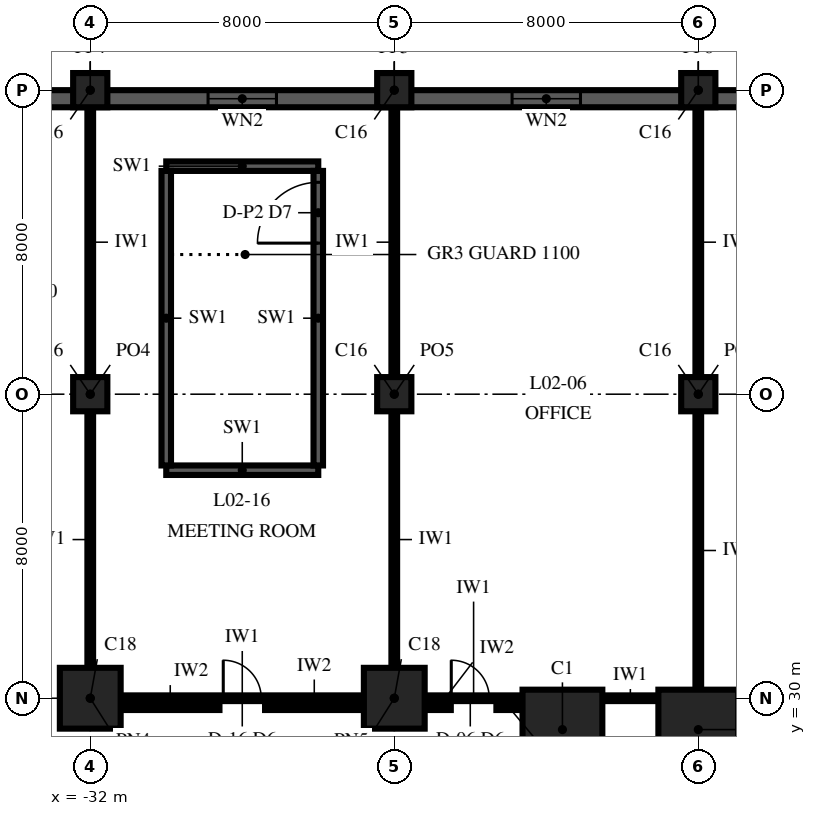
"""IFC4 building model, lengths in metres.
Left out: names, types, materials, properties, quantities, classifications, styles, units other than length and angle.
Written with IfcOpenShell. Run it as: python <this file> out.ifc"""

import sys

from ifc_helpers import new_model, si_unit, direction, frame, frame_2d, origin, origin_2d, place, context, subcontext, project, spatial, rectangle, extrude, element, fill, save


model = new_model("IFC4")
c1 = context("Model", 3, precision=1e-05, world=origin(), true_north=direction((0.0, 1.0)))
c2 = subcontext(c1, "Body", "Model", "MODEL_VIEW")
j1 = project(units=[si_unit("LENGTHUNIT", "METRE"), si_unit("PLANEANGLEUNIT", "RADIAN")], contexts=[c1])
p1 = place(None, origin())
s1 = spatial("IfcSite", under=j1, at=p1, CompositionType="ELEMENT")
p2 = place(p1, origin())
s2 = spatial("IfcBuilding", under=s1, at=p2, CompositionType="ELEMENT")
p3 = place(p2, frame((0.0, 0.0, 12.0)))
s3 = spatial("IfcBuildingStorey", under=s2, at=p3, CompositionType="ELEMENT", Elevation=12.0)
for number, where, z_axis, x_axis in (
    (1, (-16.0, 29.175, 0.0), (0.0, 0.0, 1.0), (-1.0, 0.0, 0.0)),
    (2, (-19.575, 29.175, 0.0), (0.0, 0.0, 1.0), (-1.0, 0.0, 0.0)),
):
    element("IfcColumn", number, at=place(p3, frame(where, z_axis=z_axis, x_axis=x_axis)), inside=s3, PredefinedType="COLUMN", context=c2, shape_type="SweptSolid", body=[
        extrude(rectangle(XDim=2.1, YDim=2.1, at=origin_2d()), origin(), (0.0, 0.0, 1.0), 7.0),
    ])
p4 = place(p3, frame((-32.0, 30.0, 0.0), z_axis=(0.0, 0.0, 1.0), x_axis=(1.0, 0.0, 0.0)))
e3 = element("IfcColumn", 3, at=p4, inside=s3, PredefinedType="COLUMN", context=c2, shape_type="SweptSolid", body=[
    extrude(rectangle(XDim=1.6, YDim=1.6, at=origin_2d()), origin(), (0.0, 0.0, 1.0), 7.0),
])
for number, where, z_axis, x_axis in (
    (4, (-32.0, 38.0, 0.0), (0.0, 0.0, 1.0), (1.0, 0.0, 0.0)),
    (5, (-32.0, 46.0, 0.0), (0.0, 0.0, 1.0), (1.0, 0.0, 0.0)),
):
    element("IfcColumn", number, at=place(p3, frame(where, z_axis=z_axis, x_axis=x_axis)), inside=s3, PredefinedType="COLUMN", context=c2, shape_type="SweptSolid", body=[
        extrude(rectangle(XDim=0.9, YDim=0.9, at=origin_2d()), origin(), (0.0, 0.0, 1.0), 7.0),
    ])
p5 = place(p3, frame((-24.0, 30.0, 0.0), z_axis=(0.0, 0.0, 1.0), x_axis=(1.0, 0.0, 0.0)))
e6 = element("IfcColumn", 6, at=p5, inside=s3, PredefinedType="COLUMN", context=c2, shape_type="SweptSolid", body=[
    extrude(rectangle(XDim=1.6, YDim=1.6, at=origin_2d()), origin(), (0.0, 0.0, 1.0), 7.0),
])
for number, where, z_axis, x_axis in (
    (7, (-24.0, 38.0, 0.0), (0.0, 0.0, 1.0), (1.0, 0.0, 0.0)),
    (8, (-24.0, 46.0, 0.0), (0.0, 0.0, 1.0), (1.0, 0.0, 0.0)),
    (9, (-16.0, 38.0, 0.0), (0.0, 0.0, 1.0), (1.0, 0.0, 0.0)),
    (10, (-16.0, 46.0, 0.0), (0.0, 0.0, 1.0), (1.0, 0.0, 0.0)),
):
    element("IfcColumn", number, at=place(p3, frame(where, z_axis=z_axis, x_axis=x_axis)), inside=s3, PredefinedType="COLUMN", context=c2, shape_type="SweptSolid", body=[
        extrude(rectangle(XDim=0.9, YDim=0.9, at=origin_2d()), origin(), (0.0, 0.0, 1.0), 7.0),
    ])
p6 = place(p3, frame((56.0, 45.775, 0.0), z_axis=(0.0, 0.0, 1.0), x_axis=(-1.0, 0.0, 0.0)))
e11 = element("IfcWall", 11, at=p6, inside=s3, PredefinedType="SOLIDWALL", context=c2, shape_type="SweptSolid", body=[
    extrude(rectangle(XDim=90.0, YDim=0.45, at=frame_2d((45.0, 0.0))), origin(), (0.0, 0.0, 1.0), 7.0),
])
p7 = place(p6, frame((3.1, 0.0, 1.0)))
e12 = element("IfcOpeningElement", 12, at=p7, cuts=e11, PredefinedType="OPENING", context=c2, shape_type="SweptSolid", body=[
    extrude(rectangle(XDim=1.8, YDim=3.0, at=frame_2d((0.9, 1.5))), frame((0.0, 0.24, 0.0), z_axis=(0.0, -1.0, 0.0), x_axis=(1.0, 0.0, 0.0)), (0.0, 0.0, 1.0), 0.48),
])
p8 = place(p6, frame((11.1, 0.0, 1.0)))
e13 = element("IfcOpeningElement", 13, at=p8, cuts=e11, PredefinedType="OPENING", context=c2, shape_type="SweptSolid", body=[
    extrude(rectangle(XDim=1.8, YDim=3.0, at=frame_2d((0.9, 1.5))), frame((0.0, 0.24, 0.0), z_axis=(0.0, -1.0, 0.0), x_axis=(1.0, 0.0, 0.0)), (0.0, 0.0, 1.0), 0.48),
])
p9 = place(p6, frame((19.1, 0.0, 1.0)))
e14 = element("IfcOpeningElement", 14, at=p9, cuts=e11, PredefinedType="OPENING", context=c2, shape_type="SweptSolid", body=[
    extrude(rectangle(XDim=1.8, YDim=3.0, at=frame_2d((0.9, 1.5))), frame((0.0, 0.24, 0.0), z_axis=(0.0, -1.0, 0.0), x_axis=(1.0, 0.0, 0.0)), (0.0, 0.0, 1.0), 0.48),
])
p10 = place(p6, frame((27.1, 0.0, 1.0)))
e15 = element("IfcOpeningElement", 15, at=p10, cuts=e11, PredefinedType="OPENING", context=c2, shape_type="SweptSolid", body=[
    extrude(rectangle(XDim=1.8, YDim=3.0, at=frame_2d((0.9, 1.5))), frame((0.0, 0.24, 0.0), z_axis=(0.0, -1.0, 0.0), x_axis=(1.0, 0.0, 0.0)), (0.0, 0.0, 1.0), 0.48),
])
p11 = place(p6, frame((34.9, 0.0, 1.0)))
e16 = element("IfcOpeningElement", 16, at=p11, cuts=e11, PredefinedType="OPENING", context=c2, shape_type="SweptSolid", body=[
    extrude(rectangle(XDim=0.9, YDim=3.0, at=frame_2d((0.45, 1.5))), frame((0.0, 0.24, 0.0), z_axis=(0.0, -1.0, 0.0), x_axis=(1.0, 0.0, 0.0)), (0.0, 0.0, 1.0), 0.48),
])
p12 = place(p6, frame((36.2, 0.0, 1.0)))
e17 = element("IfcOpeningElement", 17, at=p12, cuts=e11, PredefinedType="OPENING", context=c2, shape_type="SweptSolid", body=[
    extrude(rectangle(XDim=0.9, YDim=3.0, at=frame_2d((0.45, 1.5))), frame((0.0, 0.24, 0.0), z_axis=(0.0, -1.0, 0.0), x_axis=(1.0, 0.0, 0.0)), (0.0, 0.0, 1.0), 0.48),
])
p13 = place(p6, frame((43.1, 0.0, 1.0)))
e18 = element("IfcOpeningElement", 18, at=p13, cuts=e11, PredefinedType="OPENING", context=c2, shape_type="SweptSolid", body=[
    extrude(rectangle(XDim=1.8, YDim=3.0, at=frame_2d((0.9, 1.5))), frame((0.0, 0.24, 0.0), z_axis=(0.0, -1.0, 0.0), x_axis=(1.0, 0.0, 0.0)), (0.0, 0.0, 1.0), 0.48),
])
p14 = place(p6, frame((51.1, 0.0, 1.0)))
e19 = element("IfcOpeningElement", 19, at=p14, cuts=e11, PredefinedType="OPENING", context=c2, shape_type="SweptSolid", body=[
    extrude(rectangle(XDim=1.8, YDim=3.0, at=frame_2d((0.9, 1.5))), frame((0.0, 0.24, 0.0), z_axis=(0.0, -1.0, 0.0), x_axis=(1.0, 0.0, 0.0)), (0.0, 0.0, 1.0), 0.48),
])
p15 = place(p6, frame((59.1, 0.0, 1.0)))
e20 = element("IfcOpeningElement", 20, at=p15, cuts=e11, PredefinedType="OPENING", context=c2, shape_type="SweptSolid", body=[
    extrude(rectangle(XDim=1.8, YDim=3.0, at=frame_2d((0.9, 1.5))), frame((0.0, 0.24, 0.0), z_axis=(0.0, -1.0, 0.0), x_axis=(1.0, 0.0, 0.0)), (0.0, 0.0, 1.0), 0.48),
])
p16 = place(p6, frame((67.1, 0.0, 1.0)))
e21 = element("IfcOpeningElement", 21, at=p16, cuts=e11, PredefinedType="OPENING", context=c2, shape_type="SweptSolid", body=[
    extrude(rectangle(XDim=1.8, YDim=3.0, at=frame_2d((0.9, 1.5))), frame((0.0, 0.24, 0.0), z_axis=(0.0, -1.0, 0.0), x_axis=(1.0, 0.0, 0.0)), (0.0, 0.0, 1.0), 0.48),
])
p17 = place(p6, frame((75.1, 0.0, 1.0)))
e22 = element("IfcOpeningElement", 22, at=p17, cuts=e11, PredefinedType="OPENING", context=c2, shape_type="SweptSolid", body=[
    extrude(rectangle(XDim=1.8, YDim=3.0, at=frame_2d((0.9, 1.5))), frame((0.0, 0.24, 0.0), z_axis=(0.0, -1.0, 0.0), x_axis=(1.0, 0.0, 0.0)), (0.0, 0.0, 1.0), 0.48),
])
p18 = place(p6, frame((83.1, 0.0, 1.0)))
e23 = element("IfcOpeningElement", 23, at=p18, cuts=e11, PredefinedType="OPENING", context=c2, shape_type="SweptSolid", body=[
    extrude(rectangle(XDim=1.8, YDim=3.0, at=frame_2d((0.9, 1.5))), frame((0.0, 0.24, 0.0), z_axis=(0.0, -1.0, 0.0), x_axis=(1.0, 0.0, 0.0)), (0.0, 0.0, 1.0), 0.48),
])
for number, where, z_axis, x_axis in (
    (24, (-30.0, 36.0, 0.0), (0.0, 0.0, 1.0), (1.0, 0.0, 0.0)),
    (25, (-26.0, 44.0, 0.0), (0.0, 0.0, 1.0), (-1.0, 0.0, 0.0)),
):
    element("IfcWall", number, at=place(p3, frame(where, z_axis=z_axis, x_axis=x_axis)), inside=s3, PredefinedType="SOLIDWALL", context=c2, shape_type="SweptSolid", body=[
        extrude(rectangle(XDim=4.0, YDim=0.25, at=frame_2d((2.0, 0.0))), origin(), (0.0, 0.0, 1.0), 7.0),
    ])
p19 = place(p3, frame((-26.0, 36.125, 0.0), z_axis=(0.0, 0.0, 1.0), x_axis=(0.0, 1.0, 0.0)))
e26 = element("IfcWall", 26, at=p19, inside=s3, PredefinedType="SOLIDWALL", context=c2, shape_type="SweptSolid", body=[
    extrude(rectangle(XDim=7.75, YDim=0.25, at=frame_2d((3.875, 0.0))), origin(), (0.0, 0.0, 1.0), 7.0),
])
p20 = place(p19, frame((5.85, 0.0, 0.0)))
e27 = element("IfcOpeningElement", 27, at=p20, cuts=e26, PredefinedType="OPENING", context=c2, shape_type="SweptSolid", body=[
    extrude(rectangle(XDim=1.6, YDim=2.1, at=frame_2d((0.8, 1.05))), frame((0.0, 0.14, 0.0), z_axis=(0.0, -1.0, 0.0), x_axis=(1.0, 0.0, 0.0)), (0.0, 0.0, 1.0), 0.28),
])
p21 = place(p3, frame((-30.0, 43.875, 0.0), z_axis=(0.0, 0.0, 1.0), x_axis=(0.0, -1.0, 0.0)))
e28 = element("IfcWall", 28, at=p21, inside=s3, PredefinedType="SOLIDWALL", context=c2, shape_type="SweptSolid", body=[
    extrude(rectangle(XDim=7.75, YDim=0.25, at=frame_2d((3.875, 0.0))), origin(), (0.0, 0.0, 1.0), 7.0),
])
p22 = place(p3, frame((-32.0, 30.81, 0.0), z_axis=(0.0, 0.0, 1.0), x_axis=(0.0, 1.0, 0.0)))
e29 = element("IfcWall", 29, at=p22, inside=s3, PredefinedType="PARTITIONING", context=c2, shape_type="SweptSolid", body=[
    extrude(rectangle(XDim=6.73, YDim=0.15, at=frame_2d((3.365, 0.0))), origin(), (0.0, 0.0, 1.0), 5.099),
])
p23 = place(p3, frame((-32.0, 38.46, 0.0), z_axis=(0.0, 0.0, 1.0), x_axis=(0.0, 1.0, 0.0)))
e30 = element("IfcWall", 30, at=p23, inside=s3, PredefinedType="PARTITIONING", context=c2, shape_type="SweptSolid", body=[
    extrude(rectangle(XDim=7.08, YDim=0.15, at=frame_2d((3.54, 0.0))), origin(), (0.0, 0.0, 1.0), 6.05),
])
p24 = place(p3, frame((-24.0, 30.81, 0.0), z_axis=(0.0, 0.0, 1.0), x_axis=(0.0, 1.0, 0.0)))
e31 = element("IfcWall", 31, at=p24, inside=s3, PredefinedType="PARTITIONING", context=c2, shape_type="SweptSolid", body=[
    extrude(rectangle(XDim=6.73, YDim=0.15, at=frame_2d((3.365, 0.0))), origin(), (0.0, 0.0, 1.0), 6.05),
])
p25 = place(p3, frame((-24.0, 38.46, 0.0), z_axis=(0.0, 0.0, 1.0), x_axis=(0.0, 1.0, 0.0)))
e32 = element("IfcWall", 32, at=p25, inside=s3, PredefinedType="PARTITIONING", context=c2, shape_type="SweptSolid", body=[
    extrude(rectangle(XDim=7.08, YDim=0.15, at=frame_2d((3.54, 0.0))), origin(), (0.0, 0.0, 1.0), 6.05),
])
p26 = place(p3, frame((-16.0, 30.235, 0.0), z_axis=(0.0, 0.0, 1.0), x_axis=(0.0, 1.0, 0.0)))
e33 = element("IfcWall", 33, at=p26, inside=s3, PredefinedType="PARTITIONING", context=c2, shape_type="SweptSolid", body=[
    extrude(rectangle(XDim=7.305, YDim=0.15, at=frame_2d((3.652, 0.0))), origin(), (0.0, 0.0, 1.0), 6.7),
])
p27 = place(p3, frame((-16.0, 38.46, 0.0), z_axis=(0.0, 0.0, 1.0), x_axis=(0.0, 1.0, 0.0)))
e34 = element("IfcWall", 34, at=p27, inside=s3, PredefinedType="PARTITIONING", context=c2, shape_type="SweptSolid", body=[
    extrude(rectangle(XDim=7.08, YDim=0.15, at=frame_2d((3.54, 0.0))), origin(), (0.0, 0.0, 1.0), 6.05),
])
for number, where, z_axis, x_axis in (
    (35, (-31.19, 29.75, 0.0), (0.0, 0.0, 1.0), (1.0, 0.0, 0.0)),
    (36, (-27.4, 29.75, 0.0), (0.0, 0.0, 1.0), (1.0, 0.0, 0.0)),
):
    element("IfcWall", number, at=place(p3, frame(where, z_axis=z_axis, x_axis=x_axis)), inside=s3, PredefinedType="PARTITIONING", context=c2, shape_type="SweptSolid", body=[
        extrude(rectangle(XDim=2.59, YDim=0.12, at=frame_2d((1.295, 0.0))), origin(), (0.0, 0.0, 1.0), 5.099),
    ])
for number, where, z_axis, x_axis in (
    (37, (-23.19, 29.75, 0.0), (0.0, 0.0, 1.0), (1.0, 0.0, 0.0)),
    (38, (-21.312, 29.75, 0.0), (0.0, 0.0, 1.0), (1.0, 0.0, 0.0)),
):
    element("IfcWall", number, at=place(p3, frame(where, z_axis=z_axis, x_axis=x_axis)), inside=s3, PredefinedType="PARTITIONING", context=c2, shape_type="SweptSolid", body=[
        extrude(rectangle(XDim=0.677, YDim=0.12, at=frame_2d((0.339, 0.0))), origin(), (0.0, 0.0, 1.0), 6.7),
    ])
p28 = place(p3, frame((-31.19, 30.0, 0.0), z_axis=(0.0, 0.0, 1.0), x_axis=(1.0, 0.0, 0.0)))
e39 = element("IfcWall", 39, at=p28, inside=s3, PredefinedType="PARTITIONING", context=c2, shape_type="SweptSolid", body=[
    extrude(rectangle(XDim=6.38, YDim=0.15, at=frame_2d((3.19, 0.0))), origin(), (0.0, 0.0, 1.0), 5.099),
])
p29 = place(p28, frame((2.69, 0.0, 0.0)))
e40 = element("IfcOpeningElement", 40, at=p29, cuts=e39, PredefinedType="OPENING", context=c2, shape_type="SweptSolid", body=[
    extrude(rectangle(XDim=1.0, YDim=2.1, at=frame_2d((0.5, 1.05))), frame((0.0, 0.09, 0.0), z_axis=(0.0, -1.0, 0.0), x_axis=(1.0, 0.0, 0.0)), (0.0, 0.0, 1.0), 0.18),
])
p30 = place(p3, frame((-23.19, 30.0, 0.0), z_axis=(0.0, 0.0, 1.0), x_axis=(1.0, 0.0, 0.0)))
e41 = element("IfcWall", 41, at=p30, inside=s3, PredefinedType="PARTITIONING", context=c2, shape_type="SweptSolid", body=[
    extrude(rectangle(XDim=2.555, YDim=0.15, at=frame_2d((1.277, 0.0))), origin(), (0.0, 0.0, 1.0), 6.7),
])
p31 = place(p30, frame((0.69, 0.0, 0.0)))
e42 = element("IfcOpeningElement", 42, at=p31, cuts=e41, PredefinedType="OPENING", context=c2, shape_type="SweptSolid", body=[
    extrude(rectangle(XDim=1.0, YDim=2.1, at=frame_2d((0.5, 1.05))), frame((0.0, 0.09, 0.0), z_axis=(0.0, -1.0, 0.0), x_axis=(1.0, 0.0, 0.0)), (0.0, 0.0, 1.0), 0.18),
])
p32 = place(p3, frame((-18.515, 30.0, 0.0), z_axis=(0.0, 0.0, 1.0), x_axis=(1.0, 0.0, 0.0)))
e43 = element("IfcWall", 43, at=p32, inside=s3, PredefinedType="PARTITIONING", context=c2, shape_type="SweptSolid", body=[
    extrude(rectangle(XDim=1.455, YDim=0.15, at=frame_2d((0.728, 0.0))), origin(), (0.0, 0.0, 1.0), 6.7),
])
p33 = place(p17, origin())
e44 = element("IfcWindow", 44, at=p33, inside=s3, PartitioningType="SINGLE_PANEL", PredefinedType="WINDOW", context=c2, shape_type="SweptSolid", body=[
    extrude(rectangle(XDim=1.8, YDim=3.0, at=frame_2d((0.9, 1.5))), frame((0.0, 0.03, 0.0), z_axis=(0.0, -1.0, 0.0), x_axis=(1.0, 0.0, 0.0)), (0.0, 0.0, 1.0), 0.06),
])
fill(e22, e44)
p34 = place(p18, origin())
e45 = element("IfcWindow", 45, at=p34, inside=s3, PartitioningType="SINGLE_PANEL", PredefinedType="WINDOW", context=c2, shape_type="SweptSolid", body=[
    extrude(rectangle(XDim=1.8, YDim=3.0, at=frame_2d((0.9, 1.5))), frame((0.0, 0.03, 0.0), z_axis=(0.0, -1.0, 0.0), x_axis=(1.0, 0.0, 0.0)), (0.0, 0.0, 1.0), 0.06),
])
fill(e23, e45)
p35 = place(p20, origin())
e46 = element("IfcDoor", 46, at=p35, inside=s3, OperationType="DOUBLE_DOOR_SINGLE_SWING", PredefinedType="DOOR", context=c2, shape_type="SweptSolid", body=[
    extrude(rectangle(XDim=1.6, YDim=2.1, at=frame_2d((0.8, 1.05))), frame((0.0, 0.125, 0.0), z_axis=(0.0, -1.0, 0.0), x_axis=(1.0, 0.0, 0.0)), (0.0, 0.0, 1.0), 0.25),
])
fill(e27, e46)
p36 = place(p29, origin())
e47 = element("IfcDoor", 47, at=p36, inside=s3, OperationType="SINGLE_SWING_LEFT", PredefinedType="DOOR", context=c2, shape_type="SweptSolid", body=[
    extrude(rectangle(XDim=1.0, YDim=2.1, at=frame_2d((0.5, 1.05))), frame((0.0, 0.075, 0.0), z_axis=(0.0, -1.0, 0.0), x_axis=(1.0, 0.0, 0.0)), (0.0, 0.0, 1.0), 0.149),
])
fill(e40, e47)
p37 = place(p31, origin())
e48 = element("IfcDoor", 48, at=p37, inside=s3, OperationType="SINGLE_SWING_LEFT", PredefinedType="DOOR", context=c2, shape_type="SweptSolid", body=[
    extrude(rectangle(XDim=1.0, YDim=2.1, at=frame_2d((0.5, 1.05))), frame((0.0, 0.075, 0.0), z_axis=(0.0, -1.0, 0.0), x_axis=(1.0, 0.0, 0.0)), (0.0, 0.0, 1.0), 0.149),
])
fill(e42, e48)
save(model, sys.argv[1])
